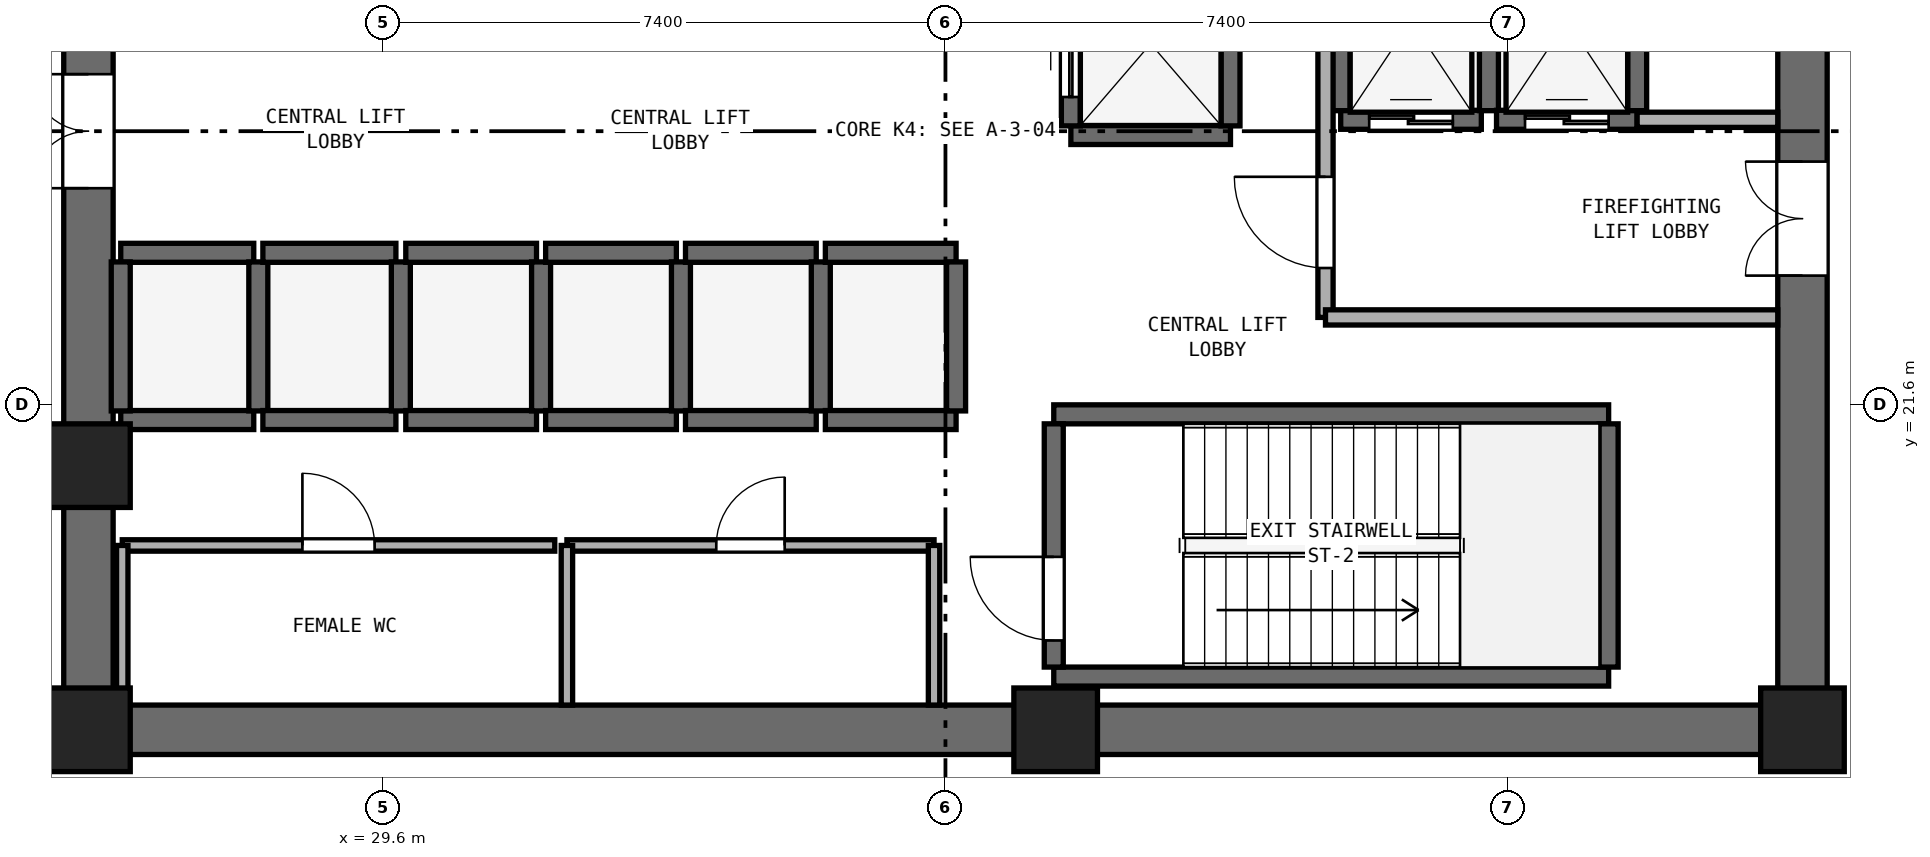
"""IFC4 building model, lengths in metres.
Left out: names, types, materials, properties, quantities, classifications, styles, units other than length and angle.
Written with IfcOpenShell. Run it as: python <this file> out.ifc"""

import sys

from ifc_helpers import new_model, si_unit, direction, frame, frame_2d, origin, origin_2d, place, context, subcontext, project, spatial, rectangle, extrude, element, fill, save


model = new_model("IFC4")
c1 = context("Model", 3, precision=1e-05, world=origin(), true_north=direction((0.0, 1.0)))
c2 = subcontext(c1, "Body", "Model", "MODEL_VIEW")
j1 = project(units=[si_unit("LENGTHUNIT", "METRE"), si_unit("PLANEANGLEUNIT", "RADIAN")], contexts=[c1])
p1 = place(None, origin())
s1 = spatial("IfcSite", under=j1, at=p1, CompositionType="ELEMENT")
p2 = place(p1, origin())
s2 = spatial("IfcBuilding", under=s1, at=p2, CompositionType="ELEMENT")
p3 = place(p2, frame((0.0, 0.0, 120.0)))
s3 = spatial("IfcBuildingStorey", under=s2, at=p3, CompositionType="ELEMENT", Elevation=120.0)
p4 = place(p3, frame((25.4, 17.325, 0.0), z_axis=(0.0, 0.0, 1.0), x_axis=(1.0, 0.0, 0.0)))
e1 = element("IfcWall", 1, at=p4, inside=s3, PredefinedType="SHEAR", context=c2, shape_type="SweptSolid", body=[
    extrude(rectangle(XDim=23.2, YDim=0.65, at=frame_2d((11.6, 0.0))), origin(), (0.0, 0.0, 1.0), 4.6),
])
p5 = place(p3, frame((25.725, 17.65, 0.0), z_axis=(0.0, 0.0, 1.0), x_axis=(0.0, 1.0, 0.0)))
e2 = element("IfcWall", 2, at=p5, inside=s3, PredefinedType="SHEAR", context=c2, shape_type="SweptSolid", body=[
    extrude(rectangle(XDim=15.1, YDim=0.65, at=frame_2d((7.55, 0.0))), origin(), (0.0, 0.0, 1.0), 4.6),
])
p6 = place(p5, frame((6.8, 0.0, 0.0)))
e3 = element("IfcOpeningElement", 3, at=p6, cuts=e2, PredefinedType="OPENING", context=c2, shape_type="SweptSolid", body=[
    extrude(rectangle(XDim=1.5, YDim=2.15, at=frame_2d((0.75, 1.075))), frame((0.0, 0.335, 0.0), z_axis=(0.0, -1.0, 0.0), x_axis=(1.0, 0.0, 0.0)), (0.0, 0.0, 1.0), 0.67),
])
p7 = place(p3, frame((48.275, 17.65, 0.0), z_axis=(0.0, 0.0, 1.0), x_axis=(0.0, 1.0, 0.0)))
e4 = element("IfcWall", 4, at=p7, inside=s3, PredefinedType="SHEAR", context=c2, shape_type="SweptSolid", body=[
    extrude(rectangle(XDim=15.1, YDim=0.65, at=frame_2d((7.55, 0.0))), origin(), (0.0, 0.0, 1.0), 4.6),
])
p8 = place(p7, frame((5.65, 0.0, 0.0)))
e5 = element("IfcOpeningElement", 5, at=p8, cuts=e4, PredefinedType="OPENING", context=c2, shape_type="SweptSolid", body=[
    extrude(rectangle(XDim=1.5, YDim=2.15, at=frame_2d((0.75, 1.075))), frame((0.0, 0.335, 0.0), z_axis=(0.0, -1.0, 0.0), x_axis=(1.0, 0.0, 0.0)), (0.0, 0.0, 1.0), 0.67),
])
for number, where, z_axis, x_axis in (
    (6, (25.725, 17.325, 0.0), (0.0, 0.0, 1.0), (1.0, 0.0, 0.0)),
    (7, (38.45, 17.325, 0.0), (0.0, 0.0, 1.0), (1.0, 0.0, 0.0)),
    (8, (48.275, 17.325, 0.0), (0.0, 0.0, 1.0), (1.0, 0.0, 0.0)),
    (9, (25.725, 20.8, 0.0), (0.0, 0.0, 1.0), (1.0, 0.0, 0.0)),
):
    element("IfcColumn", number, at=place(p3, frame(where, z_axis=z_axis, x_axis=x_axis)), inside=s3, PredefinedType="PILASTER", context=c2, shape_type="SweptSolid", body=[
        extrude(rectangle(XDim=1.1, YDim=1.1, at=origin_2d()), origin(), (0.0, 0.0, 1.0), 5.0),
    ])
for number, where, z_axis, x_axis in (
    (10, (38.425, 18.025, 0.0), (0.0, 0.0, 1.0), (1.0, 0.0, 0.0)),
    (11, (38.425, 21.475, 0.0), (0.0, 0.0, 1.0), (1.0, 0.0, 0.0)),
):
    element("IfcWall", number, at=place(p3, frame(where, z_axis=z_axis, x_axis=x_axis)), inside=s3, PredefinedType="SHEAR", context=c2, shape_type="SweptSolid", body=[
        extrude(rectangle(XDim=7.3, YDim=0.25, at=frame_2d((3.65, 0.0))), origin(), (0.0, 0.0, 1.0), 4.6),
    ])
p9 = place(p3, frame((38.425, 18.15, 0.0), z_axis=(0.0, 0.0, 1.0), x_axis=(0.0, 1.0, 0.0)))
e12 = element("IfcWall", 12, at=p9, inside=s3, PredefinedType="SHEAR", context=c2, shape_type="SweptSolid", body=[
    extrude(rectangle(XDim=3.2, YDim=0.25, at=frame_2d((1.6, 0.0))), origin(), (0.0, 0.0, 1.0), 4.6),
])
p10 = place(p9, frame((0.35, 0.0, 0.0)))
e13 = element("IfcOpeningElement", 13, at=p10, cuts=e12, PredefinedType="OPENING", context=c2, shape_type="SweptSolid", body=[
    extrude(rectangle(XDim=1.1, YDim=2.15, at=frame_2d((0.55, 1.075))), frame((0.0, 0.135, 0.0), z_axis=(0.0, -1.0, 0.0), x_axis=(1.0, 0.0, 0.0)), (0.0, 0.0, 1.0), 0.27),
])
p11 = place(p3, frame((45.725, 18.15, 0.0), z_axis=(0.0, 0.0, 1.0), x_axis=(0.0, 1.0, 0.0)))
e14 = element("IfcWall", 14, at=p11, inside=s3, PredefinedType="SHEAR", context=c2, shape_type="SweptSolid", body=[
    extrude(rectangle(XDim=3.2, YDim=0.25, at=frame_2d((1.6, 0.0))), origin(), (0.0, 0.0, 1.0), 4.6),
])
for number, where, z_axis, x_axis in (
    (15, (26.15, 21.4, 0.0), (0.0, 0.0, 1.0), (1.0, 0.0, 0.0)),
    (16, (26.15, 23.6, 0.0), (0.0, 0.0, 1.0), (1.0, 0.0, 0.0)),
):
    element("IfcWall", number, at=place(p3, frame(where, z_axis=z_axis, x_axis=x_axis)), inside=s3, PredefinedType="SHEAR", context=c2, shape_type="SweptSolid", body=[
        extrude(rectangle(XDim=1.75, YDim=0.25, at=frame_2d((0.875, 0.0))), origin(), (0.0, 0.0, 1.0), 4.6),
    ])
for number, where, z_axis, x_axis in (
    (17, (26.15, 21.52, 0.0), (0.0, 0.0, 1.0), (0.0, 1.0, 0.0)),
    (18, (27.96, 21.52, 0.0), (0.0, 0.0, 1.0), (0.0, 1.0, 0.0)),
):
    element("IfcWall", number, at=place(p3, frame(where, z_axis=z_axis, x_axis=x_axis)), inside=s3, PredefinedType="SHEAR", context=c2, shape_type="SweptSolid", body=[
        extrude(rectangle(XDim=1.96, YDim=0.25, at=frame_2d((0.98, 0.0))), origin(), (0.0, 0.0, 1.0), 4.6),
    ])
for number, where, z_axis, x_axis in (
    (19, (28.02, 21.4, 0.0), (0.0, 0.0, 1.0), (1.0, 0.0, 0.0)),
    (20, (28.02, 23.6, 0.0), (0.0, 0.0, 1.0), (1.0, 0.0, 0.0)),
):
    element("IfcWall", number, at=place(p3, frame(where, z_axis=z_axis, x_axis=x_axis)), inside=s3, PredefinedType="SHEAR", context=c2, shape_type="SweptSolid", body=[
        extrude(rectangle(XDim=1.75, YDim=0.25, at=frame_2d((0.875, 0.0))), origin(), (0.0, 0.0, 1.0), 4.6),
    ])
p12 = place(p3, frame((29.835, 21.52, 0.0), z_axis=(0.0, 0.0, 1.0), x_axis=(0.0, 1.0, 0.0)))
e21 = element("IfcWall", 21, at=p12, inside=s3, PredefinedType="SHEAR", context=c2, shape_type="SweptSolid", body=[
    extrude(rectangle(XDim=1.96, YDim=0.25, at=frame_2d((0.98, 0.0))), origin(), (0.0, 0.0, 1.0), 4.6),
])
for number, where, z_axis, x_axis in (
    (22, (29.9, 21.4, 0.0), (0.0, 0.0, 1.0), (1.0, 0.0, 0.0)),
    (23, (29.9, 23.6, 0.0), (0.0, 0.0, 1.0), (1.0, 0.0, 0.0)),
):
    element("IfcWall", number, at=place(p3, frame(where, z_axis=z_axis, x_axis=x_axis)), inside=s3, PredefinedType="SHEAR", context=c2, shape_type="SweptSolid", body=[
        extrude(rectangle(XDim=1.72, YDim=0.25, at=frame_2d((0.86, 0.0))), origin(), (0.0, 0.0, 1.0), 4.6),
    ])
p13 = place(p3, frame((31.68, 21.52, 0.0), z_axis=(0.0, 0.0, 1.0), x_axis=(0.0, 1.0, 0.0)))
e24 = element("IfcWall", 24, at=p13, inside=s3, PredefinedType="SHEAR", context=c2, shape_type="SweptSolid", body=[
    extrude(rectangle(XDim=1.96, YDim=0.25, at=frame_2d((0.98, 0.0))), origin(), (0.0, 0.0, 1.0), 4.6),
])
for number, where, z_axis, x_axis in (
    (25, (31.74, 21.4, 0.0), (0.0, 0.0, 1.0), (1.0, 0.0, 0.0)),
    (26, (31.74, 23.6, 0.0), (0.0, 0.0, 1.0), (1.0, 0.0, 0.0)),
):
    element("IfcWall", number, at=place(p3, frame(where, z_axis=z_axis, x_axis=x_axis)), inside=s3, PredefinedType="SHEAR", context=c2, shape_type="SweptSolid", body=[
        extrude(rectangle(XDim=1.72, YDim=0.25, at=frame_2d((0.86, 0.0))), origin(), (0.0, 0.0, 1.0), 4.6),
    ])
p14 = place(p3, frame((33.52, 21.52, 0.0), z_axis=(0.0, 0.0, 1.0), x_axis=(0.0, 1.0, 0.0)))
e27 = element("IfcWall", 27, at=p14, inside=s3, PredefinedType="SHEAR", context=c2, shape_type="SweptSolid", body=[
    extrude(rectangle(XDim=1.96, YDim=0.25, at=frame_2d((0.98, 0.0))), origin(), (0.0, 0.0, 1.0), 4.6),
])
for number, where, z_axis, x_axis in (
    (28, (33.58, 21.4, 0.0), (0.0, 0.0, 1.0), (1.0, 0.0, 0.0)),
    (29, (33.58, 23.6, 0.0), (0.0, 0.0, 1.0), (1.0, 0.0, 0.0)),
):
    element("IfcWall", number, at=place(p3, frame(where, z_axis=z_axis, x_axis=x_axis)), inside=s3, PredefinedType="SHEAR", context=c2, shape_type="SweptSolid", body=[
        extrude(rectangle(XDim=1.72, YDim=0.25, at=frame_2d((0.86, 0.0))), origin(), (0.0, 0.0, 1.0), 4.6),
    ])
p15 = place(p3, frame((35.36, 21.52, 0.0), z_axis=(0.0, 0.0, 1.0), x_axis=(0.0, 1.0, 0.0)))
e30 = element("IfcWall", 30, at=p15, inside=s3, PredefinedType="SHEAR", context=c2, shape_type="SweptSolid", body=[
    extrude(rectangle(XDim=1.96, YDim=0.25, at=frame_2d((0.98, 0.0))), origin(), (0.0, 0.0, 1.0), 4.6),
])
for number, where, z_axis, x_axis in (
    (31, (35.42, 21.4, 0.0), (0.0, 0.0, 1.0), (1.0, 0.0, 0.0)),
    (32, (35.42, 23.6, 0.0), (0.0, 0.0, 1.0), (1.0, 0.0, 0.0)),
):
    element("IfcWall", number, at=place(p3, frame(where, z_axis=z_axis, x_axis=x_axis)), inside=s3, PredefinedType="SHEAR", context=c2, shape_type="SweptSolid", body=[
        extrude(rectangle(XDim=1.72, YDim=0.25, at=frame_2d((0.86, 0.0))), origin(), (0.0, 0.0, 1.0), 4.6),
    ])
p16 = place(p3, frame((37.14, 21.52, 0.0), z_axis=(0.0, 0.0, 1.0), x_axis=(0.0, 1.0, 0.0)))
e33 = element("IfcWall", 33, at=p16, inside=s3, PredefinedType="SHEAR", context=c2, shape_type="SweptSolid", body=[
    extrude(rectangle(XDim=1.96, YDim=0.25, at=frame_2d((0.98, 0.0))), origin(), (0.0, 0.0, 1.0), 4.6),
])
p17 = place(p3, frame((42.2, 25.35, 0.0), z_axis=(0.0, 0.0, 1.0), x_axis=(1.0, 0.0, 0.0)))
e34 = element("IfcWall", 34, at=p17, inside=s3, PredefinedType="SHEAR", context=c2, shape_type="SweptSolid", body=[
    extrude(rectangle(XDim=1.85, YDim=0.25, at=frame_2d((0.925, 0.0))), origin(), (0.0, 0.0, 1.0), 4.6),
])
p18 = place(p17, frame((0.375, 0.0, 0.0)))
e35 = element("IfcOpeningElement", 35, at=p18, cuts=e34, PredefinedType="OPENING", context=c2, shape_type="SweptSolid", body=[
    extrude(rectangle(XDim=1.1, YDim=2.15, at=frame_2d((0.55, 1.075))), frame((0.0, 0.135, 0.0), z_axis=(0.0, -1.0, 0.0), x_axis=(1.0, 0.0, 0.0)), (0.0, 0.0, 1.0), 0.27),
])
for number, where, z_axis, x_axis in (
    (36, (42.2, 25.47, 0.0), (0.0, 0.0, 1.0), (0.0, 1.0, 0.0)),
    (37, (44.15, 25.47, 0.0), (0.0, 0.0, 1.0), (0.0, 1.0, 0.0)),
):
    element("IfcWall", number, at=place(p3, frame(where, z_axis=z_axis, x_axis=x_axis)), inside=s3, PredefinedType="SHEAR", context=c2, shape_type="SweptSolid", body=[
        extrude(rectangle(XDim=2.36, YDim=0.25, at=frame_2d((1.18, 0.0))), origin(), (0.0, 0.0, 1.0), 4.6),
    ])
p19 = place(p3, frame((44.25, 25.35, 0.0), z_axis=(0.0, 0.0, 1.0), x_axis=(1.0, 0.0, 0.0)))
e38 = element("IfcWall", 38, at=p19, inside=s3, PredefinedType="SHEAR", context=c2, shape_type="SweptSolid", body=[
    extrude(rectangle(XDim=1.85, YDim=0.25, at=frame_2d((0.925, 0.0))), origin(), (0.0, 0.0, 1.0), 4.6),
])
p20 = place(p19, frame((0.375, 0.0, 0.0)))
e39 = element("IfcOpeningElement", 39, at=p20, cuts=e38, PredefinedType="OPENING", context=c2, shape_type="SweptSolid", body=[
    extrude(rectangle(XDim=1.1, YDim=2.15, at=frame_2d((0.55, 1.075))), frame((0.0, 0.135, 0.0), z_axis=(0.0, -1.0, 0.0), x_axis=(1.0, 0.0, 0.0)), (0.0, 0.0, 1.0), 0.27),
])
p21 = place(p3, frame((46.1, 25.47, 0.0), z_axis=(0.0, 0.0, 1.0), x_axis=(0.0, 1.0, 0.0)))
e40 = element("IfcWall", 40, at=p21, inside=s3, PredefinedType="SHEAR", context=c2, shape_type="SweptSolid", body=[
    extrude(rectangle(XDim=2.36, YDim=0.25, at=frame_2d((1.18, 0.0))), origin(), (0.0, 0.0, 1.0), 4.6),
])
p22 = place(p3, frame((38.65, 25.15, 0.0), z_axis=(0.0, 0.0, 1.0), x_axis=(1.0, 0.0, 0.0)))
e41 = element("IfcWall", 41, at=p22, inside=s3, PredefinedType="SHEAR", context=c2, shape_type="SweptSolid", body=[
    extrude(rectangle(XDim=2.1, YDim=0.25, at=frame_2d((1.05, 0.0))), origin(), (0.0, 0.0, 1.0), 4.6),
])
p23 = place(p3, frame((38.65, 25.27, 0.0), z_axis=(0.0, 0.0, 1.0), x_axis=(0.0, 1.0, 0.0)))
e42 = element("IfcWall", 42, at=p23, inside=s3, PredefinedType="SHEAR", context=c2, shape_type="SweptSolid", body=[
    extrude(rectangle(XDim=2.16, YDim=0.25, at=frame_2d((1.08, 0.0))), origin(), (0.0, 0.0, 1.0), 4.6),
])
p24 = place(p23, frame((0.38, 0.0, 0.0)))
e43 = element("IfcOpeningElement", 43, at=p24, cuts=e42, PredefinedType="OPENING", context=c2, shape_type="SweptSolid", body=[
    extrude(rectangle(XDim=1.4, YDim=2.2, at=frame_2d((0.7, 1.1))), frame((0.0, 0.135, 0.0), z_axis=(0.0, -1.0, 0.0), x_axis=(1.0, 0.0, 0.0)), (0.0, 0.0, 1.0), 0.27),
])
p25 = place(p3, frame((40.75, 25.27, 0.0), z_axis=(0.0, 0.0, 1.0), x_axis=(0.0, 1.0, 0.0)))
e44 = element("IfcWall", 44, at=p25, inside=s3, PredefinedType="SHEAR", context=c2, shape_type="SweptSolid", body=[
    extrude(rectangle(XDim=2.16, YDim=0.25, at=frame_2d((1.08, 0.0))), origin(), (0.0, 0.0, 1.0), 4.6),
])
p26 = place(p3, frame((42.0, 22.75, 0.0), z_axis=(0.0, 0.0, 1.0), x_axis=(0.0, 1.0, 0.0)))
e45 = element("IfcWall", 45, at=p26, inside=s3, PredefinedType="SOLIDWALL", context=c2, shape_type="SweptSolid", body=[
    extrude(rectangle(XDim=6.05, YDim=0.2, at=frame_2d((3.025, 0.0))), origin(), (0.0, 0.0, 1.0), 4.6),
])
p27 = place(p26, frame((0.65, 0.0, 0.0)))
e46 = element("IfcOpeningElement", 46, at=p27, cuts=e45, PredefinedType="OPENING", context=c2, shape_type="SweptSolid", body=[
    extrude(rectangle(XDim=1.2, YDim=2.15, at=frame_2d((0.6, 1.075))), frame((0.0, 0.11, 0.0), z_axis=(0.0, -1.0, 0.0), x_axis=(1.0, 0.0, 0.0)), (0.0, 0.0, 1.0), 0.22),
])
p28 = place(p3, frame((42.0, 22.75, 0.0), z_axis=(0.0, 0.0, 1.0), x_axis=(1.0, 0.0, 0.0)))
e47 = element("IfcWall", 47, at=p28, inside=s3, PredefinedType="SOLIDWALL", context=c2, shape_type="SweptSolid", body=[
    extrude(rectangle(XDim=5.95, YDim=0.2, at=frame_2d((2.975, 0.0))), origin(), (0.0, 0.0, 1.0), 4.6),
])
p29 = place(p3, frame((46.1, 25.35, 0.0), z_axis=(0.0, 0.0, 1.0), x_axis=(1.0, 0.0, 0.0)))
e48 = element("IfcWall", 48, at=p29, inside=s3, PredefinedType="SOLIDWALL", context=c2, shape_type="SweptSolid", body=[
    extrude(rectangle(XDim=1.85, YDim=0.2, at=frame_2d((0.925, 0.0))), origin(), (0.0, 0.0, 1.0), 4.6),
])
p30 = place(p3, frame((26.17, 19.75, 0.0), z_axis=(0.0, 0.0, 1.0), x_axis=(1.0, 0.0, 0.0)))
e49 = element("IfcWall", 49, at=p30, inside=s3, PredefinedType="PARTITIONING", context=c2, shape_type="SweptSolid", body=[
    extrude(rectangle(XDim=5.69, YDim=0.15, at=frame_2d((2.845, 0.0))), origin(), (0.0, 0.0, 1.0), 4.6),
])
p31 = place(p30, frame((2.37, 0.0, 0.0)))
e50 = element("IfcOpeningElement", 50, at=p31, cuts=e49, PredefinedType="OPENING", context=c2, shape_type="SweptSolid", body=[
    extrude(rectangle(XDim=0.95, YDim=2.1, at=frame_2d((0.475, 1.05))), frame((0.0, 0.085, 0.0), z_axis=(0.0, -1.0, 0.0), x_axis=(1.0, 0.0, 0.0)), (0.0, 0.0, 1.0), 0.17),
])
p32 = place(p3, frame((26.17, 17.65, 0.0), z_axis=(0.0, 0.0, 1.0), x_axis=(0.0, 1.0, 0.0)))
e51 = element("IfcWall", 51, at=p32, inside=s3, PredefinedType="PARTITIONING", context=c2, shape_type="SweptSolid", body=[
    extrude(rectangle(XDim=2.1, YDim=0.15, at=frame_2d((1.05, 0.0))), origin(), (0.0, 0.0, 1.0), 4.6),
])
p33 = place(p3, frame((32.02, 19.75, 0.0), z_axis=(0.0, 0.0, 1.0), x_axis=(1.0, 0.0, 0.0)))
e52 = element("IfcWall", 52, at=p33, inside=s3, PredefinedType="PARTITIONING", context=c2, shape_type="SweptSolid", body=[
    extrude(rectangle(XDim=4.83, YDim=0.15, at=frame_2d((2.415, 0.0))), origin(), (0.0, 0.0, 1.0), 4.6),
])
p34 = place(p33, frame((1.965, 0.0, 0.0)))
e53 = element("IfcOpeningElement", 53, at=p34, cuts=e52, PredefinedType="OPENING", context=c2, shape_type="SweptSolid", body=[
    extrude(rectangle(XDim=0.9, YDim=2.1, at=frame_2d((0.45, 1.05))), frame((0.0, 0.085, 0.0), z_axis=(0.0, -1.0, 0.0), x_axis=(1.0, 0.0, 0.0)), (0.0, 0.0, 1.0), 0.17),
])
for number, where, z_axis, x_axis in (
    (54, (32.02, 17.65, 0.0), (0.0, 0.0, 1.0), (0.0, 1.0, 0.0)),
    (55, (36.85, 17.65, 0.0), (0.0, 0.0, 1.0), (0.0, 1.0, 0.0)),
):
    element("IfcWall", number, at=place(p3, frame(where, z_axis=z_axis, x_axis=x_axis)), inside=s3, PredefinedType="PARTITIONING", context=c2, shape_type="SweptSolid", body=[
        extrude(rectangle(XDim=2.1, YDim=0.15, at=frame_2d((1.05, 0.0))), origin(), (0.0, 0.0, 1.0), 4.6),
    ])
p35 = place(p10, origin())
e56 = element("IfcDoor", 56, at=p35, inside=s3, OperationType="SINGLE_SWING_RIGHT", PredefinedType="DOOR", context=c2, shape_type="SweptSolid", body=[
    extrude(rectangle(XDim=1.1, YDim=2.15, at=frame_2d((0.55, 1.075))), frame((0.0, 0.025, 0.0), z_axis=(0.0, -1.0, 0.0), x_axis=(1.0, 0.0, 0.0)), (0.0, 0.0, 1.0), 0.05),
])
fill(e13, e56)
p36 = place(p18, origin())
e57 = element("IfcDoor", 57, at=p36, inside=s3, OperationType="DOUBLE_DOOR_SLIDING", PredefinedType="DOOR", context=c2, shape_type="SweptSolid", body=[
    extrude(rectangle(XDim=1.1, YDim=2.15, at=frame_2d((0.55, 1.075))), frame((0.0, 0.025, 0.0), z_axis=(0.0, -1.0, 0.0), x_axis=(1.0, 0.0, 0.0)), (0.0, 0.0, 1.0), 0.05),
])
fill(e35, e57)
p37 = place(p20, origin())
e58 = element("IfcDoor", 58, at=p37, inside=s3, OperationType="DOUBLE_DOOR_SLIDING", PredefinedType="DOOR", context=c2, shape_type="SweptSolid", body=[
    extrude(rectangle(XDim=1.1, YDim=2.15, at=frame_2d((0.55, 1.075))), frame((0.0, 0.025, 0.0), z_axis=(0.0, -1.0, 0.0), x_axis=(1.0, 0.0, 0.0)), (0.0, 0.0, 1.0), 0.05),
])
fill(e39, e58)
p38 = place(p24, origin())
e59 = element("IfcDoor", 59, at=p38, inside=s3, OperationType="DOUBLE_DOOR_SLIDING", PredefinedType="DOOR", context=c2, shape_type="SweptSolid", body=[
    extrude(rectangle(XDim=1.4, YDim=2.2, at=frame_2d((0.7, 1.1))), frame((0.0, 0.025, 0.0), z_axis=(0.0, -1.0, 0.0), x_axis=(1.0, 0.0, 0.0)), (0.0, 0.0, 1.0), 0.05),
])
fill(e43, e59)
p39 = place(p27, origin())
e60 = element("IfcDoor", 60, at=p39, inside=s3, OperationType="SINGLE_SWING_RIGHT", PredefinedType="DOOR", context=c2, shape_type="SweptSolid", body=[
    extrude(rectangle(XDim=1.2, YDim=2.15, at=frame_2d((0.6, 1.075))), frame((0.0, 0.025, 0.0), z_axis=(0.0, -1.0, 0.0), x_axis=(1.0, 0.0, 0.0)), (0.0, 0.0, 1.0), 0.05),
])
fill(e46, e60)
p40 = place(p6, origin())
e61 = element("IfcDoor", 61, at=p40, inside=s3, OperationType="DOUBLE_DOOR_SINGLE_SWING", PredefinedType="DOOR", context=c2, shape_type="SweptSolid", body=[
    extrude(rectangle(XDim=1.5, YDim=2.15, at=frame_2d((0.75, 1.075))), frame((0.0, 0.025, 0.0), z_axis=(0.0, -1.0, 0.0), x_axis=(1.0, 0.0, 0.0)), (0.0, 0.0, 1.0), 0.05),
])
fill(e3, e61)
p41 = place(p8, origin())
e62 = element("IfcDoor", 62, at=p41, inside=s3, OperationType="DOUBLE_DOOR_SINGLE_SWING", PredefinedType="DOOR", context=c2, shape_type="SweptSolid", body=[
    extrude(rectangle(XDim=1.5, YDim=2.15, at=frame_2d((0.75, 1.075))), frame((0.0, 0.025, 0.0), z_axis=(0.0, -1.0, 0.0), x_axis=(1.0, 0.0, 0.0)), (0.0, 0.0, 1.0), 0.05),
])
fill(e5, e62)
p42 = place(p31, origin())
e63 = element("IfcDoor", 63, at=p42, inside=s3, OperationType="SINGLE_SWING_LEFT", PredefinedType="DOOR", context=c2, shape_type="SweptSolid", body=[
    extrude(rectangle(XDim=0.95, YDim=2.1, at=frame_2d((0.475, 1.05))), frame((0.0, 0.025, 0.0), z_axis=(0.0, -1.0, 0.0), x_axis=(1.0, 0.0, 0.0)), (0.0, 0.0, 1.0), 0.05),
])
fill(e50, e63)
p43 = place(p34, origin())
e64 = element("IfcDoor", 64, at=p43, inside=s3, OperationType="SINGLE_SWING_RIGHT", PredefinedType="DOOR", context=c2, shape_type="SweptSolid", body=[
    extrude(rectangle(XDim=0.9, YDim=2.1, at=frame_2d((0.45, 1.05))), frame((0.0, 0.025, 0.0), z_axis=(0.0, -1.0, 0.0), x_axis=(1.0, 0.0, 0.0)), (0.0, 0.0, 1.0), 0.05),
])
fill(e53, e64)
save(model, sys.argv[1])
